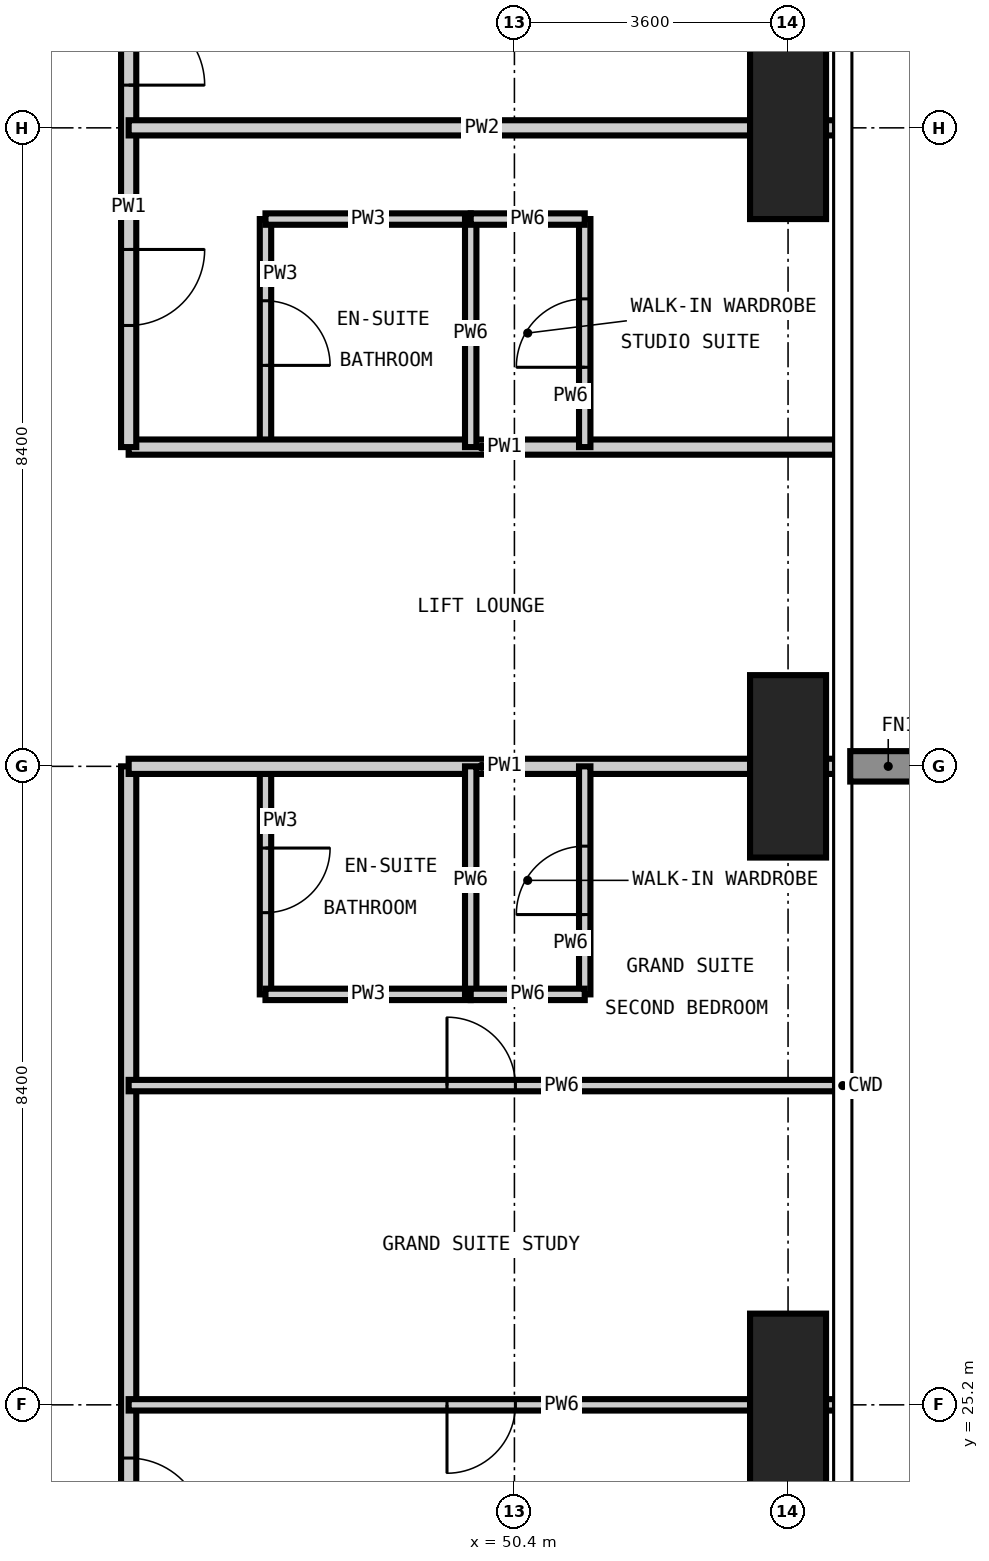
"""IFC4 building model, lengths in metres.
Left out: names, types, materials, properties, quantities, classifications, styles, units other than length and angle.
Written with IfcOpenShell. Run it as: python <this file> out.ifc"""

import sys

from ifc_helpers import new_model, si_unit, direction, frame, frame_2d, origin, origin_2d, place, context, subcontext, project, spatial, rectangle, extrude, element, fill, save


model = new_model("IFC4")
c1 = context("Model", 3, precision=1e-05, world=origin(), true_north=direction((0.0, 1.0)))
c2 = subcontext(c1, "Body", "Model", "MODEL_VIEW")
j1 = project(units=[si_unit("LENGTHUNIT", "METRE"), si_unit("PLANEANGLEUNIT", "RADIAN")], contexts=[c1])
p1 = place(None, origin())
s1 = spatial("IfcSite", under=j1, at=p1, CompositionType="ELEMENT")
p2 = place(p1, origin())
s2 = spatial("IfcBuilding", under=s1, at=p2, CompositionType="ELEMENT")
p3 = place(p2, frame((0.0, 0.0, 264.6)))
s3 = spatial("IfcBuildingStorey", under=s2, at=p3, CompositionType="ELEMENT", Elevation=264.6)
for number, where, z_axis, x_axis in (
    (1, (54.0, 25.2, -0.35), (0.0, 0.0, 1.0), (1.0, 0.0, 0.0)),
    (2, (54.0, 33.6, -0.35), (0.0, 0.0, 1.0), (1.0, 0.0, 0.0)),
    (3, (54.0, 42.0, -0.35), (0.0, 0.0, 1.0), (1.0, 0.0, 0.0)),
):
    element("IfcColumn", number, at=place(p3, frame(where, z_axis=z_axis, x_axis=x_axis)), inside=s3, PredefinedType="COLUMN", context=c2, shape_type="SweptSolid", body=[
        extrude(rectangle(XDim=1.0, YDim=2.4, at=origin_2d()), origin(), (0.0, 0.0, 1.0), 3.9),
    ])
p4 = place(p3, frame((47.125, 30.6, 0.0), z_axis=(0.0, 0.0, 1.0), x_axis=(0.0, 1.0, 0.0)))
e4 = element("IfcWall", 4, at=p4, inside=s3, PredefinedType="PARTITIONING", context=c2, shape_type="SweptSolid", body=[
    extrude(rectangle(XDim=3.0, YDim=0.15, at=frame_2d((1.5, 0.0))), origin(), (0.0, 0.0, 1.0), 3.55),
])
p5 = place(p4, frame((1.075, 0.0, 0.0)))
e5 = element("IfcOpeningElement", 5, at=p5, cuts=e4, PredefinedType="OPENING", context=c2, shape_type="SweptSolid", body=[
    extrude(rectangle(XDim=0.85, YDim=2.1, at=frame_2d((0.425, 1.05))), frame((0.0, 0.085, 0.0), z_axis=(0.0, -1.0, 0.0), x_axis=(1.0, 0.0, 0.0)), (0.0, 0.0, 1.0), 0.17),
])
p6 = place(p3, frame((47.125, 37.8, 0.0), z_axis=(0.0, 0.0, 1.0), x_axis=(0.0, 1.0, 0.0)))
e6 = element("IfcWall", 6, at=p6, inside=s3, PredefinedType="PARTITIONING", context=c2, shape_type="SweptSolid", body=[
    extrude(rectangle(XDim=3.0, YDim=0.15, at=frame_2d((1.5, 0.0))), origin(), (0.0, 0.0, 1.0), 3.55),
])
p7 = place(p6, frame((1.075, 0.0, 0.0)))
e7 = element("IfcOpeningElement", 7, at=p7, cuts=e6, PredefinedType="OPENING", context=c2, shape_type="SweptSolid", body=[
    extrude(rectangle(XDim=0.85, YDim=2.1, at=frame_2d((0.425, 1.05))), frame((0.0, 0.085, 0.0), z_axis=(0.0, -1.0, 0.0), x_axis=(1.0, 0.0, 0.0)), (0.0, 0.0, 1.0), 0.17),
])
for number, where, z_axis, x_axis in (
    (8, (47.125, 30.6, 0.0), (0.0, 0.0, 1.0), (1.0, 0.0, 0.0)),
    (9, (47.125, 40.8, 0.0), (0.0, 0.0, 1.0), (1.0, 0.0, 0.0)),
):
    element("IfcWall", number, at=place(p3, frame(where, z_axis=z_axis, x_axis=x_axis)), inside=s3, PredefinedType="PARTITIONING", context=c2, shape_type="SweptSolid", body=[
        extrude(rectangle(XDim=2.7, YDim=0.15, at=frame_2d((1.35, 0.0))), origin(), (0.0, 0.0, 1.0), 3.55),
    ])
p8 = place(p3, frame((45.325, 37.8, 0.0), z_axis=(0.0, 0.0, 1.0), x_axis=(1.0, 0.0, 0.0)))
e10 = element("IfcWall", 10, at=p8, inside=s3, PredefinedType="PARTITIONING", context=c2, shape_type="SweptSolid", body=[
    extrude(rectangle(XDim=9.293, YDim=0.2, at=frame_2d((4.646, 0.0))), origin(), (0.0, 0.0, 1.0), 3.55),
])
p9 = place(p3, frame((45.325, 33.6, 0.0), z_axis=(0.0, 0.0, 1.0), x_axis=(0.0, -1.0, 0.0)))
e11 = element("IfcWall", 11, at=p9, inside=s3, PredefinedType="PARTITIONING", context=c2, shape_type="SweptSolid", body=[
    extrude(rectangle(XDim=19.525, YDim=0.2, at=frame_2d((9.763, 0.0))), origin(), (0.0, 0.0, 1.0), 3.55),
])
p10 = place(p9, frame((9.1, 0.0, 0.0)))
e12 = element("IfcOpeningElement", 12, at=p10, cuts=e11, PredefinedType="OPENING", context=c2, shape_type="SweptSolid", body=[
    extrude(rectangle(XDim=1.0, YDim=2.2, at=frame_2d((0.5, 1.1))), frame((0.0, 0.11, 0.0), z_axis=(0.0, -1.0, 0.0), x_axis=(1.0, 0.0, 0.0)), (0.0, 0.0, 1.0), 0.22),
])
p11 = place(p9, frame((17.662, 0.0, 0.0)))
e13 = element("IfcOpeningElement", 13, at=p11, cuts=e11, PredefinedType="OPENING", context=c2, shape_type="SweptSolid", body=[
    extrude(rectangle(XDim=1.0, YDim=2.2, at=frame_2d((0.5, 1.1))), frame((0.0, 0.11, 0.0), z_axis=(0.0, -1.0, 0.0), x_axis=(1.0, 0.0, 0.0)), (0.0, 0.0, 1.0), 0.22),
])
p12 = place(p3, frame((45.325, 44.125, 0.0), z_axis=(0.0, 0.0, 1.0), x_axis=(0.0, -1.0, 0.0)))
e14 = element("IfcWall", 14, at=p12, inside=s3, PredefinedType="PARTITIONING", context=c2, shape_type="SweptSolid", body=[
    extrude(rectangle(XDim=6.325, YDim=0.2, at=frame_2d((3.163, 0.0))), origin(), (0.0, 0.0, 1.0), 3.55),
])
p13 = place(p12, frame((3.725, 0.0, 0.0)))
e15 = element("IfcOpeningElement", 15, at=p13, cuts=e14, PredefinedType="OPENING", context=c2, shape_type="SweptSolid", body=[
    extrude(rectangle(XDim=1.0, YDim=2.2, at=frame_2d((0.5, 1.1))), frame((0.0, 0.11, 0.0), z_axis=(0.0, -1.0, 0.0), x_axis=(1.0, 0.0, 0.0)), (0.0, 0.0, 1.0), 0.22),
])
p14 = place(p12, frame((0.563, 0.0, 0.0)))
e16 = element("IfcOpeningElement", 16, at=p14, cuts=e14, PredefinedType="OPENING", context=c2, shape_type="SweptSolid", body=[
    extrude(rectangle(XDim=1.0, YDim=2.2, at=frame_2d((0.5, 1.1))), frame((0.0, 0.11, 0.0), z_axis=(0.0, -1.0, 0.0), x_axis=(1.0, 0.0, 0.0)), (0.0, 0.0, 1.0), 0.22),
])
for number, where, z_axis, x_axis in (
    (17, (54.618, 33.6, 0.0), (0.0, 0.0, 1.0), (-1.0, 0.0, 0.0)),
    (18, (45.325, 42.0, 0.0), (0.0, 0.0, 1.0), (1.0, 0.0, 0.0)),
):
    element("IfcWall", number, at=place(p3, frame(where, z_axis=z_axis, x_axis=x_axis)), inside=s3, PredefinedType="PARTITIONING", context=c2, shape_type="SweptSolid", body=[
        extrude(rectangle(XDim=9.293, YDim=0.2, at=frame_2d((4.646, 0.0))), origin(), (0.0, 0.0, 1.0), 3.55),
    ])
for number, where, z_axis, x_axis in (
    (19, (49.825, 30.6, 0.0), (0.0, 0.0, 1.0), (0.0, 1.0, 0.0)),
    (20, (49.825, 37.8, 0.0), (0.0, 0.0, 1.0), (0.0, 1.0, 0.0)),
):
    element("IfcWall", number, at=place(p3, frame(where, z_axis=z_axis, x_axis=x_axis)), inside=s3, PredefinedType="PARTITIONING", context=c2, shape_type="SweptSolid", body=[
        extrude(rectangle(XDim=3.0, YDim=0.15, at=frame_2d((1.5, 0.0))), origin(), (0.0, 0.0, 1.0), 3.55),
    ])
p15 = place(p3, frame((51.325, 30.6, 0.0), z_axis=(0.0, 0.0, 1.0), x_axis=(0.0, 1.0, 0.0)))
e21 = element("IfcWall", 21, at=p15, inside=s3, PredefinedType="PARTITIONING", context=c2, shape_type="SweptSolid", body=[
    extrude(rectangle(XDim=3.0, YDim=0.15, at=frame_2d((1.5, 0.0))), origin(), (0.0, 0.0, 1.0), 3.55),
])
p16 = place(p15, frame((1.05, 0.0, 0.0)))
e22 = element("IfcOpeningElement", 22, at=p16, cuts=e21, PredefinedType="OPENING", context=c2, shape_type="SweptSolid", body=[
    extrude(rectangle(XDim=0.9, YDim=2.1, at=frame_2d((0.45, 1.05))), frame((0.0, 0.085, 0.0), z_axis=(0.0, -1.0, 0.0), x_axis=(1.0, 0.0, 0.0)), (0.0, 0.0, 1.0), 0.17),
])
p17 = place(p3, frame((51.325, 37.8, 0.0), z_axis=(0.0, 0.0, 1.0), x_axis=(0.0, 1.0, 0.0)))
e23 = element("IfcWall", 23, at=p17, inside=s3, PredefinedType="PARTITIONING", context=c2, shape_type="SweptSolid", body=[
    extrude(rectangle(XDim=3.0, YDim=0.15, at=frame_2d((1.5, 0.0))), origin(), (0.0, 0.0, 1.0), 3.55),
])
p18 = place(p17, frame((1.05, 0.0, 0.0)))
e24 = element("IfcOpeningElement", 24, at=p18, cuts=e23, PredefinedType="OPENING", context=c2, shape_type="SweptSolid", body=[
    extrude(rectangle(XDim=0.9, YDim=2.1, at=frame_2d((0.45, 1.05))), frame((0.0, 0.085, 0.0), z_axis=(0.0, -1.0, 0.0), x_axis=(1.0, 0.0, 0.0)), (0.0, 0.0, 1.0), 0.17),
])
p19 = place(p3, frame((45.325, 25.2, 0.0), z_axis=(0.0, 0.0, 1.0), x_axis=(1.0, 0.0, 0.0)))
e25 = element("IfcWall", 25, at=p19, inside=s3, PredefinedType="PARTITIONING", context=c2, shape_type="SweptSolid", body=[
    extrude(rectangle(XDim=9.293, YDim=0.15, at=frame_2d((4.646, 0.0))), origin(), (0.0, 0.0, 1.0), 3.55),
])
p20 = place(p19, frame((4.188, 0.0, 0.0)))
e26 = element("IfcOpeningElement", 26, at=p20, cuts=e25, PredefinedType="OPENING", context=c2, shape_type="SweptSolid", body=[
    extrude(rectangle(XDim=0.9, YDim=2.1, at=frame_2d((0.45, 1.05))), frame((0.0, 0.085, 0.0), z_axis=(0.0, -1.0, 0.0), x_axis=(1.0, 0.0, 0.0)), (0.0, 0.0, 1.0), 0.17),
])
p21 = place(p3, frame((45.325, 29.4, 0.0), z_axis=(0.0, 0.0, 1.0), x_axis=(1.0, 0.0, 0.0)))
e27 = element("IfcWall", 27, at=p21, inside=s3, PredefinedType="PARTITIONING", context=c2, shape_type="SweptSolid", body=[
    extrude(rectangle(XDim=9.293, YDim=0.15, at=frame_2d((4.646, 0.0))), origin(), (0.0, 0.0, 1.0), 3.55),
])
p22 = place(p21, frame((4.188, 0.0, 0.0)))
e28 = element("IfcOpeningElement", 28, at=p22, cuts=e27, PredefinedType="OPENING", context=c2, shape_type="SweptSolid", body=[
    extrude(rectangle(XDim=0.9, YDim=2.1, at=frame_2d((0.45, 1.05))), frame((0.0, 0.085, 0.0), z_axis=(0.0, -1.0, 0.0), x_axis=(1.0, 0.0, 0.0)), (0.0, 0.0, 1.0), 0.17),
])
for number, where, z_axis, x_axis in (
    (29, (49.825, 30.6, 0.0), (0.0, 0.0, 1.0), (1.0, 0.0, 0.0)),
    (30, (49.825, 40.8, 0.0), (0.0, 0.0, 1.0), (1.0, 0.0, 0.0)),
):
    element("IfcWall", number, at=place(p3, frame(where, z_axis=z_axis, x_axis=x_axis)), inside=s3, PredefinedType="PARTITIONING", context=c2, shape_type="SweptSolid", body=[
        extrude(rectangle(XDim=1.5, YDim=0.15, at=frame_2d((0.75, 0.0))), origin(), (0.0, 0.0, 1.0), 3.55),
    ])
p23 = place(p10, origin())
e31 = element("IfcDoor", 31, at=p23, inside=s3, OperationType="SINGLE_SWING_RIGHT", PredefinedType="DOOR", context=c2, shape_type="SweptSolid", body=[
    extrude(rectangle(XDim=1.0, YDim=2.2, at=frame_2d((0.5, 1.1))), frame((0.0, 0.025, 0.0), z_axis=(0.0, -1.0, 0.0), x_axis=(1.0, 0.0, 0.0)), (0.0, 0.0, 1.0), 0.05),
])
fill(e12, e31)
p24 = place(p20, frame((0.9, 0.0, 0.0), z_axis=(0.0, 0.0, 1.0), x_axis=(-1.0, 0.0, 0.0)))
e32 = element("IfcDoor", 32, at=p24, inside=s3, OperationType="SINGLE_SWING_RIGHT", PredefinedType="DOOR", context=c2, shape_type="SweptSolid", body=[
    extrude(rectangle(XDim=0.9, YDim=2.1, at=frame_2d((0.45, 1.05))), frame((0.0, 0.025, 0.0), z_axis=(0.0, -1.0, 0.0), x_axis=(1.0, 0.0, 0.0)), (0.0, 0.0, 1.0), 0.05),
])
fill(e26, e32)
p25 = place(p22, origin())
e33 = element("IfcDoor", 33, at=p25, inside=s3, OperationType="SINGLE_SWING_LEFT", PredefinedType="DOOR", context=c2, shape_type="SweptSolid", body=[
    extrude(rectangle(XDim=0.9, YDim=2.1, at=frame_2d((0.45, 1.05))), frame((0.0, 0.025, 0.0), z_axis=(0.0, -1.0, 0.0), x_axis=(1.0, 0.0, 0.0)), (0.0, 0.0, 1.0), 0.05),
])
fill(e28, e33)
p26 = place(p5, frame((0.85, 0.0, 0.0), z_axis=(0.0, 0.0, 1.0), x_axis=(-1.0, 0.0, 0.0)))
e34 = element("IfcDoor", 34, at=p26, inside=s3, OperationType="SINGLE_SWING_LEFT", PredefinedType="DOOR", context=c2, shape_type="SweptSolid", body=[
    extrude(rectangle(XDim=0.85, YDim=2.1, at=frame_2d((0.425, 1.05))), frame((0.0, 0.025, 0.0), z_axis=(0.0, -1.0, 0.0), x_axis=(1.0, 0.0, 0.0)), (0.0, 0.0, 1.0), 0.05),
])
fill(e5, e34)
p27 = place(p16, origin())
e35 = element("IfcDoor", 35, at=p27, inside=s3, OperationType="SINGLE_SWING_LEFT", PredefinedType="DOOR", context=c2, shape_type="SweptSolid", body=[
    extrude(rectangle(XDim=0.9, YDim=2.1, at=frame_2d((0.45, 1.05))), frame((0.0, 0.025, 0.0), z_axis=(0.0, -1.0, 0.0), x_axis=(1.0, 0.0, 0.0)), (0.0, 0.0, 1.0), 0.05),
])
fill(e22, e35)
p28 = place(p13, origin())
e36 = element("IfcDoor", 36, at=p28, inside=s3, OperationType="SINGLE_SWING_LEFT", PredefinedType="DOOR", context=c2, shape_type="SweptSolid", body=[
    extrude(rectangle(XDim=1.0, YDim=2.2, at=frame_2d((0.5, 1.1))), frame((0.0, 0.025, 0.0), z_axis=(0.0, -1.0, 0.0), x_axis=(1.0, 0.0, 0.0)), (0.0, 0.0, 1.0), 0.05),
])
fill(e15, e36)
p29 = place(p7, frame((0.85, 0.0, 0.0), z_axis=(0.0, 0.0, 1.0), x_axis=(-1.0, 0.0, 0.0)))
e37 = element("IfcDoor", 37, at=p29, inside=s3, OperationType="SINGLE_SWING_RIGHT", PredefinedType="DOOR", context=c2, shape_type="SweptSolid", body=[
    extrude(rectangle(XDim=0.85, YDim=2.1, at=frame_2d((0.425, 1.05))), frame((0.0, 0.025, 0.0), z_axis=(0.0, -1.0, 0.0), x_axis=(1.0, 0.0, 0.0)), (0.0, 0.0, 1.0), 0.05),
])
fill(e7, e37)
p30 = place(p18, origin())
e38 = element("IfcDoor", 38, at=p30, inside=s3, OperationType="SINGLE_SWING_LEFT", PredefinedType="DOOR", context=c2, shape_type="SweptSolid", body=[
    extrude(rectangle(XDim=0.9, YDim=2.1, at=frame_2d((0.45, 1.05))), frame((0.0, 0.025, 0.0), z_axis=(0.0, -1.0, 0.0), x_axis=(1.0, 0.0, 0.0)), (0.0, 0.0, 1.0), 0.05),
])
fill(e24, e38)
p31 = place(p14, origin())
e39 = element("IfcDoor", 39, at=p31, inside=s3, OperationType="SINGLE_SWING_RIGHT", PredefinedType="DOOR", context=c2, shape_type="SweptSolid", body=[
    extrude(rectangle(XDim=1.0, YDim=2.2, at=frame_2d((0.5, 1.1))), frame((0.0, 0.025, 0.0), z_axis=(0.0, -1.0, 0.0), x_axis=(1.0, 0.0, 0.0)), (0.0, 0.0, 1.0), 0.05),
])
fill(e16, e39)
save(model, sys.argv[1])
